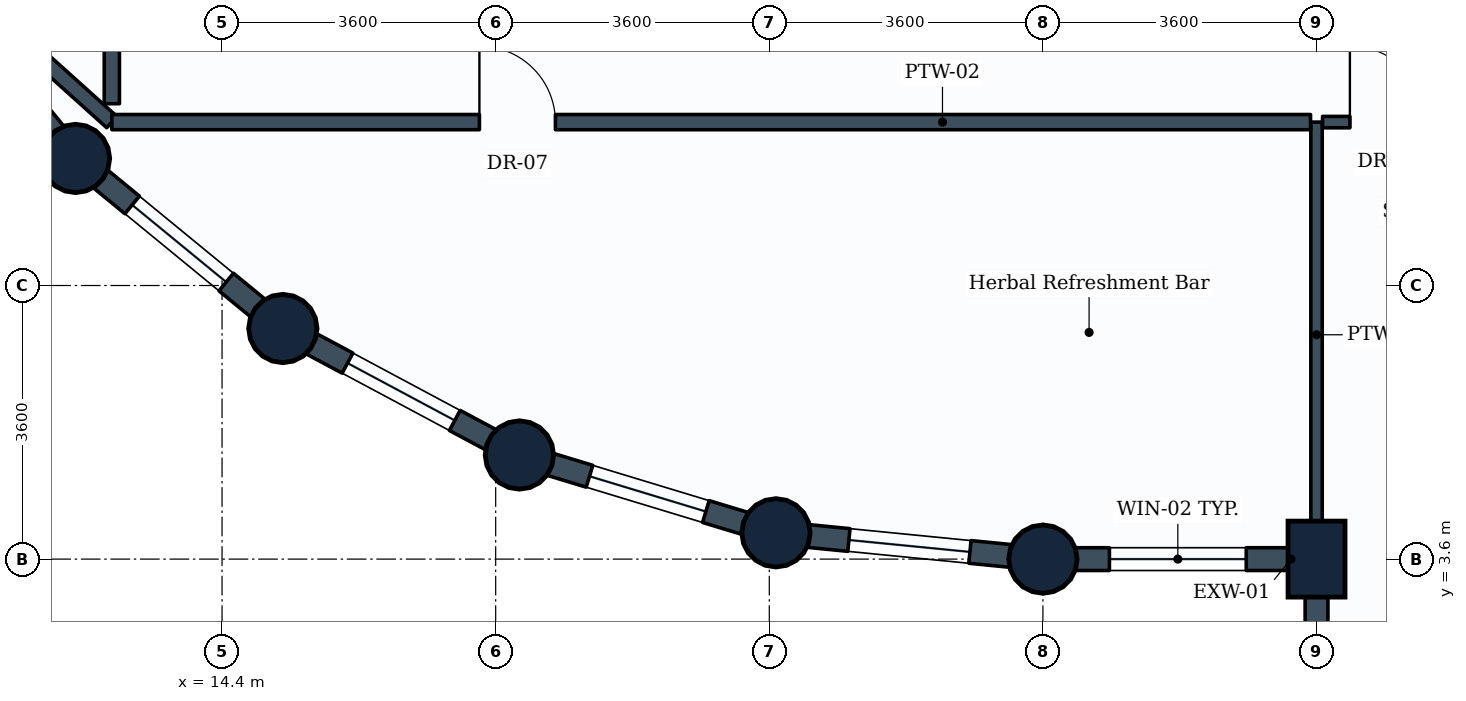
"""IFC4 building model, lengths in metres.
Left out: names, types, materials, properties, quantities, classifications, styles, units other than length and angle.
Written with IfcOpenShell. Run it as: python <this file> out.ifc"""

import sys

from ifc_helpers import new_model, si_unit, direction, frame, frame_2d, origin, origin_2d, place, context, subcontext, project, spatial, rectangle, circle, extrude, element, fill, save


model = new_model("IFC4")
c1 = context("Model", 3, precision=1e-05, world=origin(), true_north=direction((0.0, 1.0)))
c2 = subcontext(c1, "Body", "Model", "MODEL_VIEW")
j1 = project(units=[si_unit("LENGTHUNIT", "METRE"), si_unit("PLANEANGLEUNIT", "RADIAN")], contexts=[c1])
p1 = place(None, origin())
s1 = spatial("IfcSite", under=j1, at=p1, CompositionType="ELEMENT")
p2 = place(p1, origin())
s2 = spatial("IfcBuilding", under=s1, at=p2, CompositionType="ELEMENT")
p3 = place(p2, frame((0.0, 0.0, 165.6)))
s3 = spatial("IfcBuildingStorey", under=s2, at=p3, CompositionType="ELEMENT", Elevation=165.6)
for number, where, z_axis, x_axis in (
    (1, (12.472, 8.872, 0.0), (0.0, 0.0, 1.0), (1.0, 0.0, 0.0)),
    (2, (15.2, 6.634, 0.0), (0.0, 0.0, 1.0), (1.0, 0.0, 0.0)),
    (3, (18.312, 4.97, 0.0), (0.0, 0.0, 1.0), (1.0, 0.0, 0.0)),
    (4, (21.688, 3.946, 0.0), (0.0, 0.0, 1.0), (1.0, 0.0, 0.0)),
    (5, (25.2, 3.6, 0.0), (0.0, 0.0, 1.0), (1.0, 0.0, 0.0)),
):
    element("IfcColumn", number, at=place(p3, frame(where, z_axis=z_axis, x_axis=x_axis)), inside=s3, PredefinedType="COLUMN", context=c2, shape_type="SweptSolid", body=[
        extrude(circle(Radius=0.45, at=origin_2d()), origin(), (0.0, 0.0, 1.0), 3.8),
    ])
p4 = place(p3, frame((28.8, 3.6, 0.0), z_axis=(0.0, 0.0, 1.0), x_axis=(1.0, 0.0, 0.0)))
e6 = element("IfcColumn", 6, at=p4, inside=s3, PredefinedType="COLUMN", context=c2, shape_type="SweptSolid", body=[
    extrude(rectangle(XDim=0.75, YDim=1.0, at=origin_2d()), origin(), (0.0, 0.0, 1.0), 3.8),
])
p5 = place(p3, frame((28.8, 3.6, 0.0), z_axis=(0.0, 0.0, 1.0), x_axis=(-1.0, 0.0, 0.0)))
e7 = element("IfcWall", 7, at=p5, inside=s3, PredefinedType="STANDARD", context=c2, shape_type="SweptSolid", body=[
    extrude(rectangle(XDim=3.6, YDim=0.3, at=frame_2d((1.8, 0.0))), origin(), (0.0, 0.0, 1.0), 2.93),
])
p6 = place(p5, frame((0.925, 0.0, 0.85)))
e8 = element("IfcOpeningElement", 8, at=p6, cuts=e7, PredefinedType="OPENING", context=c2, shape_type="SweptSolid", body=[
    extrude(rectangle(XDim=1.8, YDim=1.35, at=frame_2d((0.9, 0.675))), frame((0.0, 0.16, 0.0), z_axis=(0.0, -1.0, 0.0), x_axis=(1.0, 0.0, 0.0)), (0.0, 0.0, 1.0), 0.32),
])
p7 = place(p3, frame((28.8, 3.6, 0.0), z_axis=(0.0, 0.0, 1.0), x_axis=(0.0, -1.0, 0.0)))
e9 = element("IfcWall", 9, at=p7, inside=s3, PredefinedType="STANDARD", context=c2, shape_type="SweptSolid", body=[
    extrude(rectangle(XDim=2.1, YDim=0.3, at=frame_2d((1.05, 0.0))), origin(), (0.0, 0.0, 1.0), 2.93),
])
p8 = place(p3, frame((12.472, 8.872, 0.0), z_axis=(0.0, 0.0, 1.0), x_axis=(-0.634258295121, 0.773121216285, 0.0)))
e10 = element("IfcWall", 10, at=p8, inside=s3, PredefinedType="STANDARD", context=c2, shape_type="SweptSolid", body=[
    extrude(rectangle(XDim=3.529, YDim=0.3, at=frame_2d((1.764, 0.0))), origin(), (0.0, 0.0, 1.0), 2.93),
])
p9 = place(p8, frame((0.964, 0.0, 0.85)))
e11 = element("IfcOpeningElement", 11, at=p9, cuts=e10, PredefinedType="OPENING", context=c2, shape_type="SweptSolid", body=[
    extrude(rectangle(XDim=1.6, YDim=1.35, at=frame_2d((0.8, 0.675))), frame((0.0, 0.16, 0.0), z_axis=(0.0, -1.0, 0.0), x_axis=(1.0, 0.0, 0.0)), (0.0, 0.0, 1.0), 0.32),
])
p10 = place(p3, frame((15.2, 6.634, 0.0), z_axis=(0.0, 0.0, 1.0), x_axis=(-0.773121216285, 0.634258295121, 0.0)))
e12 = element("IfcWall", 12, at=p10, inside=s3, PredefinedType="STANDARD", context=c2, shape_type="SweptSolid", body=[
    extrude(rectangle(XDim=3.529, YDim=0.3, at=frame_2d((1.764, 0.0))), origin(), (0.0, 0.0, 1.0), 2.93),
])
p11 = place(p10, frame((0.964, 0.0, 0.85)))
e13 = element("IfcOpeningElement", 13, at=p11, cuts=e12, PredefinedType="OPENING", context=c2, shape_type="SweptSolid", body=[
    extrude(rectangle(XDim=1.6, YDim=1.35, at=frame_2d((0.8, 0.675))), frame((0.0, 0.16, 0.0), z_axis=(0.0, -1.0, 0.0), x_axis=(1.0, 0.0, 0.0)), (0.0, 0.0, 1.0), 0.32),
])
p12 = place(p3, frame((18.312, 4.97, 0.0), z_axis=(0.0, 0.0, 1.0), x_axis=(-0.881846862014, 0.471535907389, 0.0)))
e14 = element("IfcWall", 14, at=p12, inside=s3, PredefinedType="STANDARD", context=c2, shape_type="SweptSolid", body=[
    extrude(rectangle(XDim=3.529, YDim=0.3, at=frame_2d((1.765, 0.0))), origin(), (0.0, 0.0, 1.0), 2.93),
])
p13 = place(p12, frame((0.964, 0.0, 0.85)))
e15 = element("IfcOpeningElement", 15, at=p13, cuts=e14, PredefinedType="OPENING", context=c2, shape_type="SweptSolid", body=[
    extrude(rectangle(XDim=1.6, YDim=1.35, at=frame_2d((0.8, 0.675))), frame((0.0, 0.16, 0.0), z_axis=(0.0, -1.0, 0.0), x_axis=(1.0, 0.0, 0.0)), (0.0, 0.0, 1.0), 0.32),
])
p14 = place(p3, frame((21.688, 3.946, 0.0), z_axis=(0.0, 0.0, 1.0), x_axis=(-0.956953367403, 0.290241714123, 0.0)))
e16 = element("IfcWall", 16, at=p14, inside=s3, PredefinedType="STANDARD", context=c2, shape_type="SweptSolid", body=[
    extrude(rectangle(XDim=3.528, YDim=0.3, at=frame_2d((1.764, 0.0))), origin(), (0.0, 0.0, 1.0), 2.93),
])
p15 = place(p14, frame((0.964, 0.0, 0.85)))
e17 = element("IfcOpeningElement", 17, at=p15, cuts=e16, PredefinedType="OPENING", context=c2, shape_type="SweptSolid", body=[
    extrude(rectangle(XDim=1.6, YDim=1.35, at=frame_2d((0.8, 0.675))), frame((0.0, 0.16, 0.0), z_axis=(0.0, -1.0, 0.0), x_axis=(1.0, 0.0, 0.0)), (0.0, 0.0, 1.0), 0.32),
])
p16 = place(p3, frame((25.2, 3.6, 0.0), z_axis=(0.0, 0.0, 1.0), x_axis=(-0.995183369056, 0.098030923459, 0.0)))
e18 = element("IfcWall", 18, at=p16, inside=s3, PredefinedType="STANDARD", context=c2, shape_type="SweptSolid", body=[
    extrude(rectangle(XDim=3.529, YDim=0.3, at=frame_2d((1.765, 0.0))), origin(), (0.0, 0.0, 1.0), 2.93),
])
p17 = place(p16, frame((0.965, 0.0, 0.85)))
e19 = element("IfcOpeningElement", 19, at=p17, cuts=e18, PredefinedType="OPENING", context=c2, shape_type="SweptSolid", body=[
    extrude(rectangle(XDim=1.6, YDim=1.35, at=frame_2d((0.8, 0.675))), frame((0.0, 0.16, 0.0), z_axis=(0.0, -1.0, 0.0), x_axis=(1.0, 0.0, 0.0)), (0.0, 0.0, 1.0), 0.32),
])
p18 = place(p3, frame((28.8, 9.35, 0.0), z_axis=(0.0, 0.0, 1.0), x_axis=(0.0, -1.0, 0.0)))
e20 = element("IfcWall", 20, at=p18, inside=s3, PredefinedType="PARTITIONING", context=c2, shape_type="SweptSolid", body=[
    extrude(rectangle(XDim=5.596, YDim=0.15, at=frame_2d((2.798, 0.0))), origin(), (0.0, 0.0, 1.0), 3.465),
])
p19 = place(p3, frame((12.95, 9.35, 0.0), z_axis=(0.0, 0.0, 1.0), x_axis=(-0.743629108244, 0.66859236413, 0.0)))
e21 = element("IfcWall", 21, at=p19, inside=s3, PredefinedType="PARTITIONING", context=c2, shape_type="SweptSolid", body=[
    extrude(rectangle(XDim=2.935, YDim=0.2, at=frame_2d((1.467, 0.0))), origin(), (0.0, 0.0, 1.0), 2.93),
])
p20 = place(p3, frame((12.95, 9.592, 0.0), z_axis=(0.0, 0.0, 1.0), x_axis=(0.0, 1.0, 0.0)))
e22 = element("IfcWall", 22, at=p20, inside=s3, PredefinedType="PARTITIONING", context=c2, shape_type="SweptSolid", body=[
    extrude(rectangle(XDim=6.683, YDim=0.2, at=frame_2d((3.341, 0.0))), origin(), (0.0, 0.0, 1.0), 3.1),
])
p21 = place(p20, frame((3.989, 0.0, 0.0)))
e23 = element("IfcOpeningElement", 23, at=p21, cuts=e22, PredefinedType="OPENING", context=c2, shape_type="SweptSolid", body=[
    extrude(rectangle(XDim=1.0, YDim=2.1, at=frame_2d((0.5, 1.05))), frame((0.0, 0.11, 0.0), z_axis=(0.0, -1.0, 0.0), x_axis=(1.0, 0.0, 0.0)), (0.0, 0.0, 1.0), 0.22),
])
p22 = place(p3, frame((12.95, 9.35, 0.0), z_axis=(0.0, 0.0, 1.0), x_axis=(1.0, 0.0, 0.0)))
e24 = element("IfcWall", 24, at=p22, inside=s3, PredefinedType="PARTITIONING", context=c2, shape_type="SweptSolid", body=[
    extrude(rectangle(XDim=15.771, YDim=0.2, at=frame_2d((7.885, 0.0))), origin(), (0.0, 0.0, 1.0), 3.1),
])
p23 = place(p22, frame((4.836, 0.0, 0.0)))
e25 = element("IfcOpeningElement", 25, at=p23, cuts=e24, PredefinedType="OPENING", context=c2, shape_type="SweptSolid", body=[
    extrude(rectangle(XDim=1.0, YDim=2.1, at=frame_2d((0.5, 1.05))), frame((0.0, 0.11, 0.0), z_axis=(0.0, -1.0, 0.0), x_axis=(1.0, 0.0, 0.0)), (0.0, 0.0, 1.0), 0.22),
])
p24 = place(p3, frame((28.879, 9.35, 0.0), z_axis=(0.0, 0.0, 1.0), x_axis=(1.0, 0.0, 0.0)))
e26 = element("IfcWall", 26, at=p24, inside=s3, PredefinedType="PARTITIONING", context=c2, shape_type="SweptSolid", body=[
    extrude(rectangle(XDim=5.521, YDim=0.15, at=frame_2d((2.76, 0.0))), origin(), (0.0, 0.0, 1.0), 3.465),
])
p25 = place(p24, frame((0.36, 0.0, 0.0)))
e27 = element("IfcOpeningElement", 27, at=p25, cuts=e26, PredefinedType="OPENING", context=c2, shape_type="SweptSolid", body=[
    extrude(rectangle(XDim=1.0, YDim=2.1, at=frame_2d((0.5, 1.05))), frame((0.0, 0.085, 0.0), z_axis=(0.0, -1.0, 0.0), x_axis=(1.0, 0.0, 0.0)), (0.0, 0.0, 1.0), 0.17),
])
p26 = place(p6, origin())
e28 = element("IfcWindow", 28, at=p26, inside=s3, PartitioningType="SINGLE_PANEL", PredefinedType="WINDOW", context=c2, shape_type="SweptSolid", body=[
    extrude(rectangle(XDim=1.8, YDim=1.35, at=frame_2d((0.9, 0.675))), frame((0.0, 0.03, 0.0), z_axis=(0.0, -1.0, 0.0), x_axis=(1.0, 0.0, 0.0)), (0.0, 0.0, 1.0), 0.06),
])
fill(e8, e28)
p27 = place(p11, origin())
e29 = element("IfcWindow", 29, at=p27, inside=s3, PartitioningType="SINGLE_PANEL", PredefinedType="WINDOW", context=c2, shape_type="SweptSolid", body=[
    extrude(rectangle(XDim=1.6, YDim=1.35, at=frame_2d((0.8, 0.675))), frame((0.0, 0.03, 0.0), z_axis=(0.0, -1.0, 0.0), x_axis=(1.0, 0.0, 0.0)), (0.0, 0.0, 1.0), 0.06),
])
fill(e13, e29)
p28 = place(p13, origin())
e30 = element("IfcWindow", 30, at=p28, inside=s3, PartitioningType="SINGLE_PANEL", PredefinedType="WINDOW", context=c2, shape_type="SweptSolid", body=[
    extrude(rectangle(XDim=1.6, YDim=1.35, at=frame_2d((0.8, 0.675))), frame((0.0, 0.03, 0.0), z_axis=(0.0, -1.0, 0.0), x_axis=(1.0, 0.0, 0.0)), (0.0, 0.0, 1.0), 0.06),
])
fill(e15, e30)
p29 = place(p15, origin())
e31 = element("IfcWindow", 31, at=p29, inside=s3, PartitioningType="SINGLE_PANEL", PredefinedType="WINDOW", context=c2, shape_type="SweptSolid", body=[
    extrude(rectangle(XDim=1.6, YDim=1.35, at=frame_2d((0.8, 0.675))), frame((0.0, 0.03, 0.0), z_axis=(0.0, -1.0, 0.0), x_axis=(1.0, 0.0, 0.0)), (0.0, 0.0, 1.0), 0.06),
])
fill(e17, e31)
p30 = place(p17, origin())
e32 = element("IfcWindow", 32, at=p30, inside=s3, PartitioningType="SINGLE_PANEL", PredefinedType="WINDOW", context=c2, shape_type="SweptSolid", body=[
    extrude(rectangle(XDim=1.6, YDim=1.35, at=frame_2d((0.8, 0.675))), frame((0.0, 0.03, 0.0), z_axis=(0.0, -1.0, 0.0), x_axis=(1.0, 0.0, 0.0)), (0.0, 0.0, 1.0), 0.06),
])
fill(e19, e32)
p31 = place(p23, origin())
e33 = element("IfcDoor", 33, at=p31, inside=s3, OperationType="SINGLE_SWING_LEFT", PredefinedType="DOOR", context=c2, shape_type="SweptSolid", body=[
    extrude(rectangle(XDim=1.0, YDim=2.1, at=frame_2d((0.5, 1.05))), frame((0.0, 0.025, 0.0), z_axis=(0.0, -1.0, 0.0), x_axis=(1.0, 0.0, 0.0)), (0.0, 0.0, 1.0), 0.05),
])
fill(e25, e33)
p32 = place(p25, origin())
e34 = element("IfcDoor", 34, at=p32, inside=s3, OperationType="SINGLE_SWING_LEFT", PredefinedType="DOOR", context=c2, shape_type="SweptSolid", body=[
    extrude(rectangle(XDim=1.0, YDim=2.1, at=frame_2d((0.5, 1.05))), frame((0.0, 0.025, 0.0), z_axis=(0.0, -1.0, 0.0), x_axis=(1.0, 0.0, 0.0)), (0.0, 0.0, 1.0), 0.05),
])
fill(e27, e34)
save(model, sys.argv[1])
